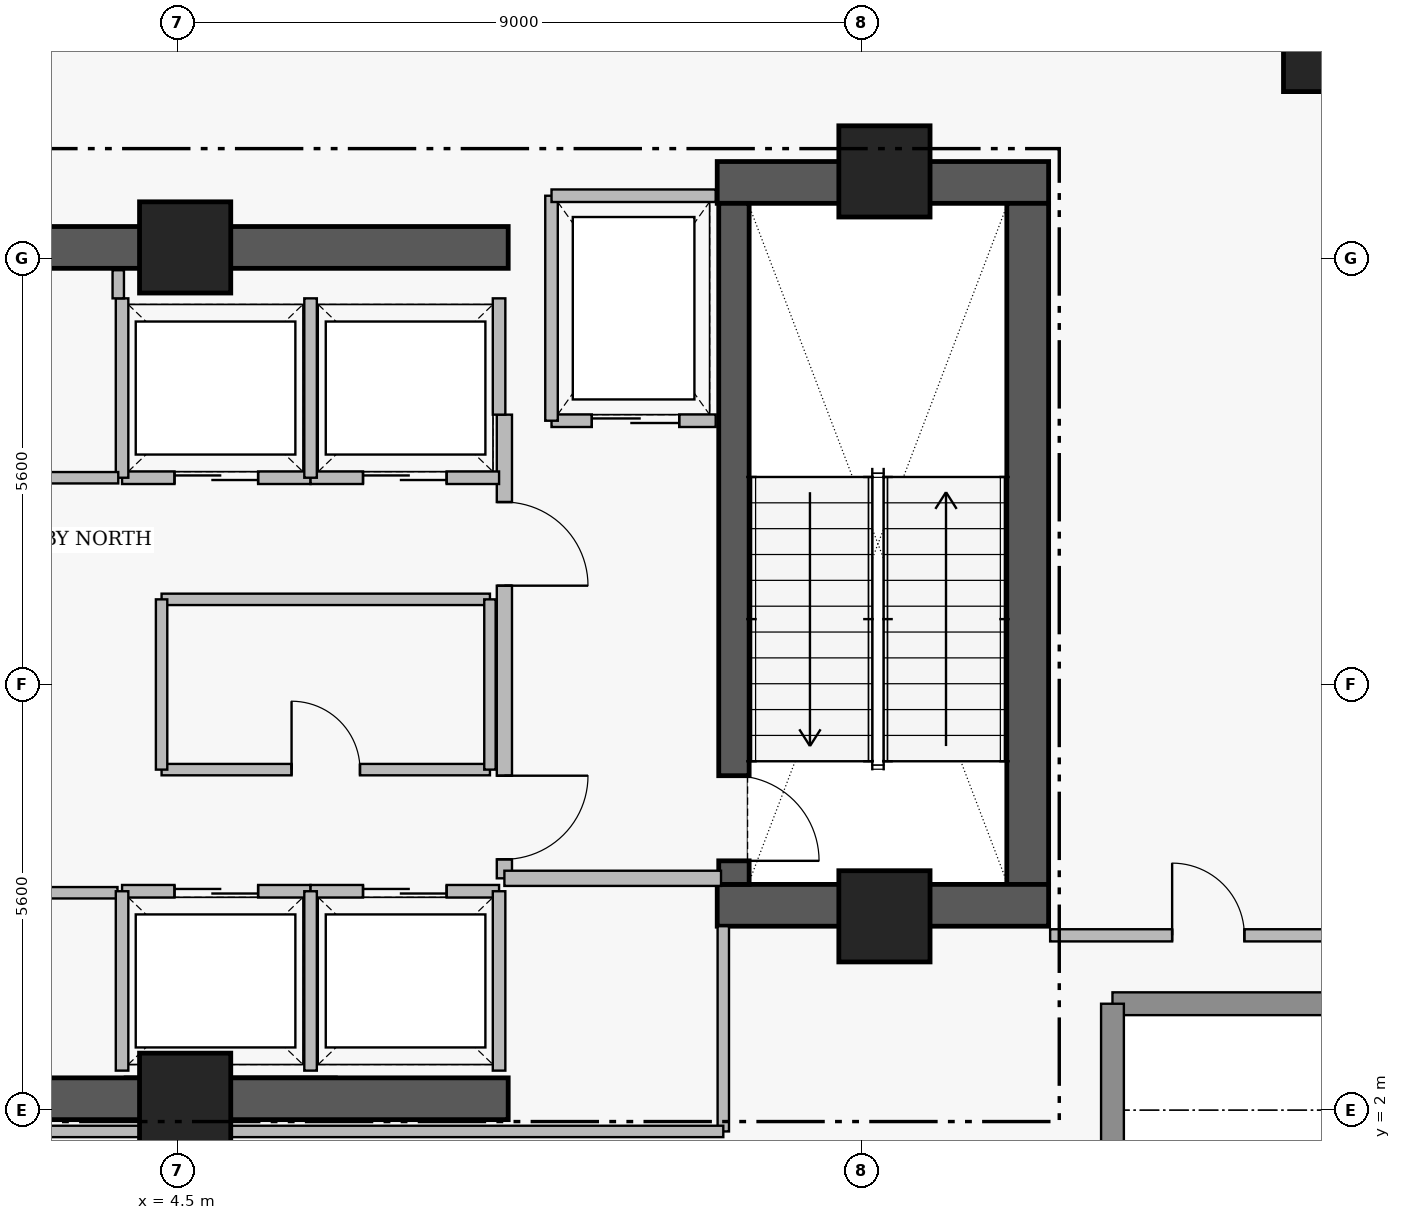
"""IFC4 building model, lengths in metres.
Left out: names, types, materials, properties, quantities, classifications, styles, units other than length and angle.
Written with IfcOpenShell. Run it as: python <this file> out.ifc"""

import sys

from ifc_helpers import new_model, si_unit, direction, frame, frame_2d, origin, origin_2d, place, context, subcontext, project, spatial, rectangle, extrude, element, fill, save


model = new_model("IFC4")
c1 = context("Model", 3, precision=1e-05, world=origin(), true_north=direction((0.0, 1.0)))
c2 = subcontext(c1, "Body", "Model", "MODEL_VIEW")
j1 = project(units=[si_unit("LENGTHUNIT", "METRE"), si_unit("PLANEANGLEUNIT", "RADIAN")], contexts=[c1])
p1 = place(None, origin())
s1 = spatial("IfcSite", under=j1, at=p1, CompositionType="ELEMENT")
p2 = place(p1, origin())
s2 = spatial("IfcBuilding", under=s1, at=p2, CompositionType="ELEMENT")
p3 = place(p2, frame((0.0, 0.0, 288.45)))
s3 = spatial("IfcBuildingStorey", under=s2, at=p3, CompositionType="ELEMENT", Elevation=288.45)
p4 = place(p3, frame((11.6, 14.205, 0.0), z_axis=(0.0, 0.0, 1.0), x_axis=(1.0, 0.0, 0.0)))
e1 = element("IfcWall", 1, at=p4, inside=s3, PredefinedType="SHEAR", context=c2, shape_type="SweptSolid", body=[
    extrude(rectangle(XDim=4.36, YDim=0.55, at=frame_2d((2.18, 0.0))), origin(), (0.0, 0.0, 1.0), 4.21),
])
p5 = place(p3, frame((15.685, 4.97, 0.0), z_axis=(0.0, 0.0, 1.0), x_axis=(0.0, 1.0, 0.0)))
e2 = element("IfcWall", 2, at=p5, inside=s3, PredefinedType="SHEAR", context=c2, shape_type="SweptSolid", body=[
    extrude(rectangle(XDim=8.96, YDim=0.55, at=frame_2d((4.48, 0.0))), origin(), (0.0, 0.0, 1.0), 4.21),
])
p6 = place(p3, frame((11.6, 4.695, 0.0), z_axis=(0.0, 0.0, 1.0), x_axis=(1.0, 0.0, 0.0)))
e3 = element("IfcWall", 3, at=p6, inside=s3, PredefinedType="SHEAR", context=c2, shape_type="SweptSolid", body=[
    extrude(rectangle(XDim=4.36, YDim=0.55, at=frame_2d((2.18, 0.0))), origin(), (0.0, 0.0, 1.0), 4.21),
])
for number, where, z_axis, x_axis in (
    (4, (1.25, 2.15, 0.0), (0.0, 0.0, 1.0), (1.0, 0.0, 0.0)),
    (5, (1.25, 13.35, 0.0), (0.0, 0.0, 1.0), (1.0, 0.0, 0.0)),
):
    element("IfcWall", number, at=place(p3, frame(where, z_axis=z_axis, x_axis=x_axis)), inside=s3, PredefinedType="SHEAR", context=c2, shape_type="SweptSolid", body=[
        extrude(rectangle(XDim=7.6, YDim=0.55, at=frame_2d((3.8, 0.0))), origin(), (0.0, 0.0, 1.0), 4.18),
    ])
p7 = place(p3, frame((11.82, 13.93, 0.0), z_axis=(0.0, 0.0, 1.0), x_axis=(0.0, -1.0, 0.0)))
e6 = element("IfcWall", 6, at=p7, inside=s3, PredefinedType="SHEAR", context=c2, shape_type="SweptSolid", body=[
    extrude(rectangle(XDim=8.96, YDim=0.4, at=frame_2d((4.48, 0.0))), origin(), (0.0, 0.0, 1.0), 4.21),
])
p8 = place(p7, frame((7.53, 0.0, 0.0)))
e7 = element("IfcOpeningElement", 7, at=p8, cuts=e6, PredefinedType="OPENING", context=c2, shape_type="SweptSolid", body=[
    extrude(rectangle(XDim=1.12, YDim=2.22, at=frame_2d((0.56, 1.11))), frame((0.0, 0.21, 0.0), z_axis=(0.0, -1.0, 0.0), x_axis=(1.0, 0.0, 0.0)), (0.0, 0.0, 1.0), 0.42),
])
for number, where, z_axis, x_axis in (
    (8, (4.6, 13.35, 0.0), (0.0, 0.0, 1.0), (1.0, 0.0, 0.0)),
    (9, (13.8, 14.35, 0.0), (0.0, 0.0, 1.0), (1.0, 0.0, 0.0)),
    (10, (4.6, 2.15, 0.0), (0.0, 0.0, 1.0), (1.0, 0.0, 0.0)),
    (11, (13.8, 4.55, 0.0), (0.0, 0.0, 1.0), (1.0, 0.0, 0.0)),
):
    element("IfcColumn", number, at=place(p3, frame(where, z_axis=z_axis, x_axis=x_axis)), inside=s3, PredefinedType="COLUMN", context=c2, shape_type="SweptSolid", body=[
        extrude(rectangle(XDim=1.2, YDim=1.2, at=origin_2d()), origin(), (0.0, 0.0, 1.0), 4.4),
    ])
p9 = place(p3, frame((19.55, 15.9, 0.0), z_axis=(0.0, 0.0, 1.0), x_axis=(1.0, 0.0, 0.0)))
e12 = element("IfcColumn", 12, at=p9, inside=s3, PredefinedType="COLUMN", context=c2, shape_type="SweptSolid", body=[
    extrude(rectangle(XDim=1.0, YDim=1.0, at=origin_2d()), origin(), (0.0, 0.0, 1.0), 4.4),
])
p10 = place(p3, frame((20.2, 3.4, 0.0), z_axis=(0.0, 0.0, 1.0), x_axis=(-1.0, 0.0, 0.0)))
e13 = element("IfcWall", 13, at=p10, inside=s3, PredefinedType="STANDARD", context=c2, shape_type="SweptSolid", body=[
    extrude(rectangle(XDim=3.4, YDim=0.3, at=frame_2d((1.7, 0.0))), origin(), (0.0, 0.0, 1.0), 4.18),
])
p11 = place(p3, frame((16.8, 3.4, 0.0), z_axis=(0.0, 0.0, 1.0), x_axis=(0.0, -1.0, 0.0)))
e14 = element("IfcWall", 14, at=p11, inside=s3, PredefinedType="STANDARD", context=c2, shape_type="SweptSolid", body=[
    extrude(rectangle(XDim=3.4, YDim=0.3, at=frame_2d((1.7, 0.0))), origin(), (0.0, 0.0, 1.0), 4.18),
])
p12 = place(p11, frame((2.13, 0.0, 0.0)))
e15 = element("IfcOpeningElement", 15, at=p12, cuts=e14, PredefinedType="OPENING", context=c2, shape_type="SweptSolid", body=[
    extrude(rectangle(XDim=1.05, YDim=2.2, at=frame_2d((0.525, 1.1))), frame((0.0, 0.16, 0.0), z_axis=(0.0, -1.0, 0.0), x_axis=(1.0, 0.0, 0.0)), (0.0, 0.0, 1.0), 0.32),
])
p13 = place(p3, frame((8.8, 11.15, 0.0), z_axis=(0.0, 0.0, 1.0), x_axis=(0.0, -1.0, 0.0)))
e16 = element("IfcWall", 16, at=p13, inside=s3, PredefinedType="PARTITIONING", context=c2, shape_type="SweptSolid", body=[
    extrude(rectangle(XDim=6.1, YDim=0.2, at=frame_2d((3.05, 0.0))), origin(), (0.0, 0.0, 1.0), 4.18),
])
p14 = place(p13, frame((1.15, 0.0, 0.0)))
e17 = element("IfcOpeningElement", 17, at=p14, cuts=e16, PredefinedType="OPENING", context=c2, shape_type="SweptSolid", body=[
    extrude(rectangle(XDim=1.1, YDim=2.2, at=frame_2d((0.55, 1.1))), frame((0.0, 0.11, 0.0), z_axis=(0.0, -1.0, 0.0), x_axis=(1.0, 0.0, 0.0)), (0.0, 0.0, 1.0), 0.22),
])
p15 = place(p13, frame((4.75, 0.0, 0.0)))
e18 = element("IfcOpeningElement", 18, at=p15, cuts=e16, PredefinedType="OPENING", context=c2, shape_type="SweptSolid", body=[
    extrude(rectangle(XDim=1.1, YDim=2.2, at=frame_2d((0.55, 1.1))), frame((0.0, 0.11, 0.0), z_axis=(0.0, -1.0, 0.0), x_axis=(1.0, 0.0, 0.0)), (0.0, 0.0, 1.0), 0.22),
])
p16 = place(p3, frame((9.42, 11.07, 0.0), z_axis=(0.0, 0.0, 1.0), x_axis=(1.0, 0.0, 0.0)))
e19 = element("IfcWall", 19, at=p16, inside=s3, PredefinedType="PARTITIONING", context=c2, shape_type="SweptSolid", body=[
    extrude(rectangle(XDim=2.16, YDim=0.165, at=frame_2d((1.08, 0.0))), origin(), (0.0, 0.0, 1.0), 4.18),
])
p17 = place(p16, frame((0.53, 0.0, 0.0)))
e20 = element("IfcOpeningElement", 20, at=p17, cuts=e19, PredefinedType="OPENING", context=c2, shape_type="SweptSolid", body=[
    extrude(rectangle(XDim=1.15, YDim=2.25, at=frame_2d((0.575, 1.125))), frame((0.0, 0.093, 0.0), z_axis=(0.0, -1.0, 0.0), x_axis=(1.0, 0.0, 0.0)), (0.0, 0.0, 1.0), 0.185),
])
p18 = place(p3, frame((3.77, 4.88, 0.0), z_axis=(0.0, 0.0, 1.0), x_axis=(1.0, 0.0, 0.0)))
e21 = element("IfcWall", 21, at=p18, inside=s3, PredefinedType="PARTITIONING", context=c2, shape_type="SweptSolid", body=[
    extrude(rectangle(XDim=2.48, YDim=0.165, at=frame_2d((1.24, 0.0))), origin(), (0.0, 0.0, 1.0), 4.18),
])
p19 = place(p18, frame((0.69, 0.0, 0.0)))
e22 = element("IfcOpeningElement", 22, at=p19, cuts=e21, PredefinedType="OPENING", context=c2, shape_type="SweptSolid", body=[
    extrude(rectangle(XDim=1.1, YDim=2.25, at=frame_2d((0.55, 1.125))), frame((0.0, 0.093, 0.0), z_axis=(0.0, -1.0, 0.0), x_axis=(1.0, 0.0, 0.0)), (0.0, 0.0, 1.0), 0.185),
])
p20 = place(p3, frame((6.25, 4.88, 0.0), z_axis=(0.0, 0.0, 1.0), x_axis=(1.0, 0.0, 0.0)))
e23 = element("IfcWall", 23, at=p20, inside=s3, PredefinedType="PARTITIONING", context=c2, shape_type="SweptSolid", body=[
    extrude(rectangle(XDim=2.48, YDim=0.165, at=frame_2d((1.24, 0.0))), origin(), (0.0, 0.0, 1.0), 4.18),
])
p21 = place(p20, frame((0.69, 0.0, 0.0)))
e24 = element("IfcOpeningElement", 24, at=p21, cuts=e23, PredefinedType="OPENING", context=c2, shape_type="SweptSolid", body=[
    extrude(rectangle(XDim=1.1, YDim=2.25, at=frame_2d((0.55, 1.125))), frame((0.0, 0.093, 0.0), z_axis=(0.0, -1.0, 0.0), x_axis=(1.0, 0.0, 0.0)), (0.0, 0.0, 1.0), 0.185),
])
p22 = place(p3, frame((3.77, 10.32, 0.0), z_axis=(0.0, 0.0, 1.0), x_axis=(1.0, 0.0, 0.0)))
e25 = element("IfcWall", 25, at=p22, inside=s3, PredefinedType="PARTITIONING", context=c2, shape_type="SweptSolid", body=[
    extrude(rectangle(XDim=2.48, YDim=0.165, at=frame_2d((1.24, 0.0))), origin(), (0.0, 0.0, 1.0), 4.18),
])
p23 = place(p22, frame((0.69, 0.0, 0.0)))
e26 = element("IfcOpeningElement", 26, at=p23, cuts=e25, PredefinedType="OPENING", context=c2, shape_type="SweptSolid", body=[
    extrude(rectangle(XDim=1.1, YDim=2.25, at=frame_2d((0.55, 1.125))), frame((0.0, 0.093, 0.0), z_axis=(0.0, -1.0, 0.0), x_axis=(1.0, 0.0, 0.0)), (0.0, 0.0, 1.0), 0.185),
])
p24 = place(p3, frame((6.25, 10.32, 0.0), z_axis=(0.0, 0.0, 1.0), x_axis=(1.0, 0.0, 0.0)))
e27 = element("IfcWall", 27, at=p24, inside=s3, PredefinedType="PARTITIONING", context=c2, shape_type="SweptSolid", body=[
    extrude(rectangle(XDim=2.48, YDim=0.165, at=frame_2d((1.24, 0.0))), origin(), (0.0, 0.0, 1.0), 4.18),
])
p25 = place(p24, frame((0.69, 0.0, 0.0)))
e28 = element("IfcOpeningElement", 28, at=p25, cuts=e27, PredefinedType="OPENING", context=c2, shape_type="SweptSolid", body=[
    extrude(rectangle(XDim=1.1, YDim=2.25, at=frame_2d((0.55, 1.125))), frame((0.0, 0.093, 0.0), z_axis=(0.0, -1.0, 0.0), x_axis=(1.0, 0.0, 0.0)), (0.0, 0.0, 1.0), 0.185),
])
p26 = place(p3, frame((-0.26, 4.86, 0.0), z_axis=(0.0, 0.0, 1.0), x_axis=(1.0, 0.0, 0.0)))
e29 = element("IfcWall", 29, at=p26, inside=s3, PredefinedType="PARTITIONING", context=c2, shape_type="SweptSolid", body=[
    extrude(rectangle(XDim=3.97, YDim=0.15, at=frame_2d((1.985, 0.0))), origin(), (0.0, 0.0, 1.0), 4.18),
])
p27 = place(p26, frame((1.535, 0.0, 0.0)))
e30 = element("IfcOpeningElement", 30, at=p27, cuts=e29, PredefinedType="OPENING", context=c2, shape_type="SweptSolid", body=[
    extrude(rectangle(XDim=0.9, YDim=2.15, at=frame_2d((0.45, 1.075))), frame((0.0, 0.085, 0.0), z_axis=(0.0, -1.0, 0.0), x_axis=(1.0, 0.0, 0.0)), (0.0, 0.0, 1.0), 0.17),
])
p28 = place(p3, frame((4.29, 6.48, 0.0), z_axis=(0.0, 0.0, 1.0), x_axis=(1.0, 0.0, 0.0)))
e31 = element("IfcWall", 31, at=p28, inside=s3, PredefinedType="PARTITIONING", context=c2, shape_type="SweptSolid", body=[
    extrude(rectangle(XDim=4.32, YDim=0.15, at=frame_2d((2.16, 0.0))), origin(), (0.0, 0.0, 1.0), 4.18),
])
p29 = place(p28, frame((1.71, 0.0, 0.0)))
e32 = element("IfcOpeningElement", 32, at=p29, cuts=e31, PredefinedType="OPENING", context=c2, shape_type="SweptSolid", body=[
    extrude(rectangle(XDim=0.9, YDim=2.15, at=frame_2d((0.45, 1.075))), frame((0.0, 0.085, 0.0), z_axis=(0.0, -1.0, 0.0), x_axis=(1.0, 0.0, 0.0)), (0.0, 0.0, 1.0), 0.17),
])
p30 = place(p3, frame((15.98, 4.3, 0.0), z_axis=(0.0, 0.0, 1.0), x_axis=(1.0, 0.0, 0.0)))
e33 = element("IfcWall", 33, at=p30, inside=s3, PredefinedType="PARTITIONING", context=c2, shape_type="SweptSolid", body=[
    extrude(rectangle(XDim=4.16, YDim=0.16, at=frame_2d((2.08, 0.0))), origin(), (0.0, 0.0, 1.0), 4.18),
])
p31 = place(p30, frame((1.605, 0.0, 0.0)))
e34 = element("IfcOpeningElement", 34, at=p31, cuts=e33, PredefinedType="OPENING", context=c2, shape_type="SweptSolid", body=[
    extrude(rectangle(XDim=0.95, YDim=2.15, at=frame_2d((0.475, 1.075))), frame((0.0, 0.09, 0.0), z_axis=(0.0, -1.0, 0.0), x_axis=(1.0, 0.0, 0.0)), (0.0, 0.0, 1.0), 0.18),
])
p32 = place(p3, frame((8.8, 5.05, 0.0), z_axis=(0.0, 0.0, 1.0), x_axis=(1.0, 0.0, 0.0)))
e35 = element("IfcWall", 35, at=p32, inside=s3, PredefinedType="PARTITIONING", context=c2, shape_type="SweptSolid", body=[
    extrude(rectangle(XDim=2.85, YDim=0.2, at=frame_2d((1.425, 0.0))), origin(), (0.0, 0.0, 1.0), 4.18),
])
p33 = place(p3, frame((9.42, 11.07, 0.0), z_axis=(0.0, 0.0, 1.0), x_axis=(0.0, 1.0, 0.0)))
e36 = element("IfcWall", 36, at=p33, inside=s3, PredefinedType="PARTITIONING", context=c2, shape_type="SweptSolid", body=[
    extrude(rectangle(XDim=2.96, YDim=0.165, at=frame_2d((1.48, 0.0))), origin(), (0.0, 0.0, 1.0), 4.18),
])
p34 = place(p3, frame((9.42, 14.03, 0.0), z_axis=(0.0, 0.0, 1.0), x_axis=(1.0, 0.0, 0.0)))
e37 = element("IfcWall", 37, at=p34, inside=s3, PredefinedType="PARTITIONING", context=c2, shape_type="SweptSolid", body=[
    extrude(rectangle(XDim=2.16, YDim=0.165, at=frame_2d((1.08, 0.0))), origin(), (0.0, 0.0, 1.0), 4.18),
])
for number, where, z_axis, x_axis in (
    (38, (3.77, 2.52, 0.0), (0.0, 0.0, 1.0), (0.0, 1.0, 0.0)),
    (39, (6.25, 2.52, 0.0), (0.0, 0.0, 1.0), (0.0, 1.0, 0.0)),
    (40, (8.73, 2.52, 0.0), (0.0, 0.0, 1.0), (0.0, 1.0, 0.0)),
    (41, (3.77, 10.32, 0.0), (0.0, 0.0, 1.0), (0.0, 1.0, 0.0)),
    (42, (6.25, 10.32, 0.0), (0.0, 0.0, 1.0), (0.0, 1.0, 0.0)),
):
    element("IfcWall", number, at=place(p3, frame(where, z_axis=z_axis, x_axis=x_axis)), inside=s3, PredefinedType="PARTITIONING", context=c2, shape_type="SweptSolid", body=[
        extrude(rectangle(XDim=2.36, YDim=0.165, at=frame_2d((1.18, 0.0))), origin(), (0.0, 0.0, 1.0), 4.18),
    ])
p35 = place(p3, frame((8.73, 11.15, 0.0), z_axis=(0.0, 0.0, 1.0), x_axis=(0.0, 1.0, 0.0)))
e43 = element("IfcWall", 43, at=p35, inside=s3, PredefinedType="PARTITIONING", context=c2, shape_type="SweptSolid", body=[
    extrude(rectangle(XDim=1.53, YDim=0.165, at=frame_2d((0.765, 0.0))), origin(), (0.0, 0.0, 1.0), 4.18),
])
p36 = place(p3, frame((4.29, 8.72, 0.0), z_axis=(0.0, 0.0, 1.0), x_axis=(1.0, 0.0, 0.0)))
e44 = element("IfcWall", 44, at=p36, inside=s3, PredefinedType="PARTITIONING", context=c2, shape_type="SweptSolid", body=[
    extrude(rectangle(XDim=4.32, YDim=0.15, at=frame_2d((2.16, 0.0))), origin(), (0.0, 0.0, 1.0), 4.18),
])
for number, where, z_axis, x_axis in (
    (45, (4.29, 6.48, 0.0), (0.0, 0.0, 1.0), (0.0, 1.0, 0.0)),
    (46, (8.61, 6.48, 0.0), (0.0, 0.0, 1.0), (0.0, 1.0, 0.0)),
):
    element("IfcWall", number, at=place(p3, frame(where, z_axis=z_axis, x_axis=x_axis)), inside=s3, PredefinedType="PARTITIONING", context=c2, shape_type="SweptSolid", body=[
        extrude(rectangle(XDim=2.24, YDim=0.15, at=frame_2d((1.12, 0.0))), origin(), (0.0, 0.0, 1.0), 4.18),
    ])
p37 = place(p3, frame((1.18, 10.32, 0.0), z_axis=(0.0, 0.0, 1.0), x_axis=(1.0, 0.0, 0.0)))
e47 = element("IfcWall", 47, at=p37, inside=s3, PredefinedType="PARTITIONING", context=c2, shape_type="SweptSolid", body=[
    extrude(rectangle(XDim=2.54, YDim=0.15, at=frame_2d((1.27, 0.0))), origin(), (0.0, 0.0, 1.0), 4.18),
])
p38 = place(p3, frame((3.72, 12.68, 0.0), z_axis=(0.0, 0.0, 1.0), x_axis=(0.0, 1.0, 0.0)))
e48 = element("IfcWall", 48, at=p38, inside=s3, PredefinedType="PARTITIONING", context=c2, shape_type="SweptSolid", body=[
    extrude(rectangle(XDim=0.37, YDim=0.15, at=frame_2d((0.185, 0.0))), origin(), (0.0, 0.0, 1.0), 4.18),
])
p39 = place(p3, frame((11.68, 1.72, 0.0), z_axis=(0.0, 0.0, 1.0), x_axis=(0.0, 1.0, 0.0)))
e49 = element("IfcWall", 49, at=p39, inside=s3, PredefinedType="PARTITIONING", context=c2, shape_type="SweptSolid", body=[
    extrude(rectangle(XDim=2.7, YDim=0.15, at=frame_2d((1.35, 0.0))), origin(), (0.0, 0.0, 1.0), 4.18),
])
p40 = place(p3, frame((0.0, 1.72, 0.0), z_axis=(0.0, 0.0, 1.0), x_axis=(1.0, 0.0, 0.0)))
e50 = element("IfcWall", 50, at=p40, inside=s3, PredefinedType="PARTITIONING", context=c2, shape_type="SweptSolid", body=[
    extrude(rectangle(XDim=11.68, YDim=0.15, at=frame_2d((5.84, 0.0))), origin(), (0.0, 0.0, 1.0), 3.08),
])
p41 = place(p8, origin())
e51 = element("IfcDoor", 51, at=p41, inside=s3, OperationType="SINGLE_SWING_RIGHT", PredefinedType="DOOR", context=c2, shape_type="SweptSolid", body=[
    extrude(rectangle(XDim=1.12, YDim=2.22, at=frame_2d((0.56, 1.11))), frame((0.0, 0.025, 0.0), z_axis=(0.0, -1.0, 0.0), x_axis=(1.0, 0.0, 0.0)), (0.0, 0.0, 1.0), 0.05),
])
fill(e7, e51)
p42 = place(p14, origin())
e52 = element("IfcDoor", 52, at=p42, inside=s3, OperationType="SINGLE_SWING_RIGHT", PredefinedType="DOOR", context=c2, shape_type="SweptSolid", body=[
    extrude(rectangle(XDim=1.1, YDim=2.2, at=frame_2d((0.55, 1.1))), frame((0.0, 0.025, 0.0), z_axis=(0.0, -1.0, 0.0), x_axis=(1.0, 0.0, 0.0)), (0.0, 0.0, 1.0), 0.05),
])
fill(e17, e52)
p43 = place(p15, origin())
e53 = element("IfcDoor", 53, at=p43, inside=s3, OperationType="SINGLE_SWING_LEFT", PredefinedType="DOOR", context=c2, shape_type="SweptSolid", body=[
    extrude(rectangle(XDim=1.1, YDim=2.2, at=frame_2d((0.55, 1.1))), frame((0.0, 0.025, 0.0), z_axis=(0.0, -1.0, 0.0), x_axis=(1.0, 0.0, 0.0)), (0.0, 0.0, 1.0), 0.05),
])
fill(e18, e53)
p44 = place(p17, origin())
e54 = element("IfcDoor", 54, at=p44, inside=s3, OperationType="SLIDING_TO_LEFT", PredefinedType="DOOR", context=c2, shape_type="SweptSolid", body=[
    extrude(rectangle(XDim=1.15, YDim=2.25, at=frame_2d((0.575, 1.125))), frame((0.0, 0.025, 0.0), z_axis=(0.0, -1.0, 0.0), x_axis=(1.0, 0.0, 0.0)), (0.0, 0.0, 1.0), 0.05),
])
fill(e20, e54)
p45 = place(p19, origin())
e55 = element("IfcDoor", 55, at=p45, inside=s3, OperationType="SLIDING_TO_LEFT", PredefinedType="DOOR", context=c2, shape_type="SweptSolid", body=[
    extrude(rectangle(XDim=1.1, YDim=2.25, at=frame_2d((0.55, 1.125))), frame((0.0, 0.025, 0.0), z_axis=(0.0, -1.0, 0.0), x_axis=(1.0, 0.0, 0.0)), (0.0, 0.0, 1.0), 0.05),
])
fill(e22, e55)
p46 = place(p21, origin())
e56 = element("IfcDoor", 56, at=p46, inside=s3, OperationType="SLIDING_TO_LEFT", PredefinedType="DOOR", context=c2, shape_type="SweptSolid", body=[
    extrude(rectangle(XDim=1.1, YDim=2.25, at=frame_2d((0.55, 1.125))), frame((0.0, 0.025, 0.0), z_axis=(0.0, -1.0, 0.0), x_axis=(1.0, 0.0, 0.0)), (0.0, 0.0, 1.0), 0.05),
])
fill(e24, e56)
p47 = place(p23, origin())
e57 = element("IfcDoor", 57, at=p47, inside=s3, OperationType="SLIDING_TO_LEFT", PredefinedType="DOOR", context=c2, shape_type="SweptSolid", body=[
    extrude(rectangle(XDim=1.1, YDim=2.25, at=frame_2d((0.55, 1.125))), frame((0.0, 0.025, 0.0), z_axis=(0.0, -1.0, 0.0), x_axis=(1.0, 0.0, 0.0)), (0.0, 0.0, 1.0), 0.05),
])
fill(e26, e57)
p48 = place(p25, origin())
e58 = element("IfcDoor", 58, at=p48, inside=s3, OperationType="SLIDING_TO_LEFT", PredefinedType="DOOR", context=c2, shape_type="SweptSolid", body=[
    extrude(rectangle(XDim=1.1, YDim=2.25, at=frame_2d((0.55, 1.125))), frame((0.0, 0.025, 0.0), z_axis=(0.0, -1.0, 0.0), x_axis=(1.0, 0.0, 0.0)), (0.0, 0.0, 1.0), 0.05),
])
fill(e28, e58)
p49 = place(p29, origin())
e59 = element("IfcDoor", 59, at=p49, inside=s3, OperationType="SINGLE_SWING_LEFT", PredefinedType="DOOR", context=c2, shape_type="SweptSolid", body=[
    extrude(rectangle(XDim=0.9, YDim=2.15, at=frame_2d((0.45, 1.075))), frame((0.0, 0.025, 0.0), z_axis=(0.0, -1.0, 0.0), x_axis=(1.0, 0.0, 0.0)), (0.0, 0.0, 1.0), 0.05),
])
fill(e32, e59)
p50 = place(p31, origin())
e60 = element("IfcDoor", 60, at=p50, inside=s3, OperationType="SINGLE_SWING_LEFT", PredefinedType="DOOR", context=c2, shape_type="SweptSolid", body=[
    extrude(rectangle(XDim=0.95, YDim=2.15, at=frame_2d((0.475, 1.075))), frame((0.0, 0.025, 0.0), z_axis=(0.0, -1.0, 0.0), x_axis=(1.0, 0.0, 0.0)), (0.0, 0.0, 1.0), 0.05),
])
fill(e34, e60)
save(model, sys.argv[1])
